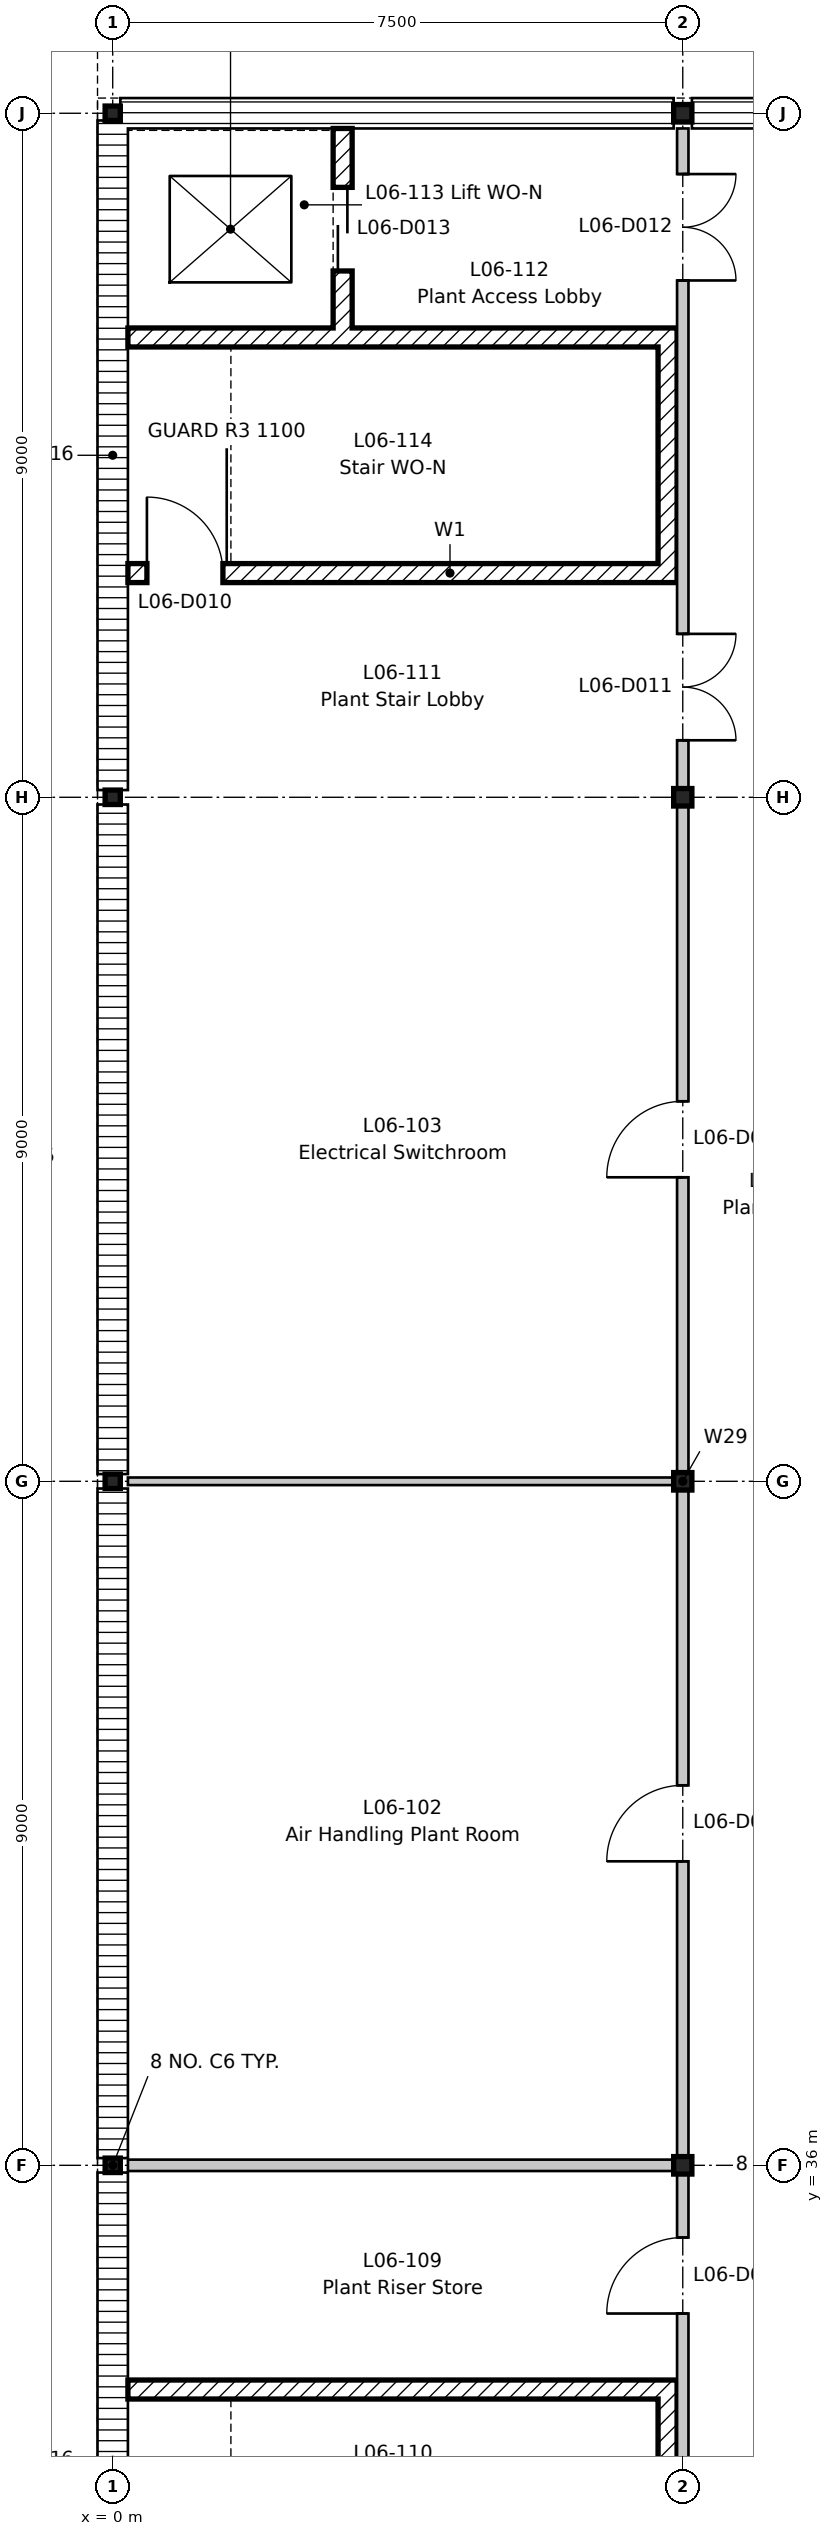
"""IFC4 building model, lengths in metres.
Left out: names, types, materials, properties, quantities, classifications, styles, units other than length and angle.
Written with IfcOpenShell. Run it as: python <this file> out.ifc"""

import sys

from ifc_helpers import new_model, si_unit, direction, frame, frame_2d, origin, origin_2d, place, context, subcontext, project, spatial, rectangle, i_section, extrude, element, fill, save


model = new_model("IFC4")
c1 = context("Model", 3, precision=1e-05, world=origin(), true_north=direction((0.0, 1.0)))
c2 = subcontext(c1, "Body", "Model", "MODEL_VIEW")
j1 = project(units=[si_unit("LENGTHUNIT", "METRE"), si_unit("PLANEANGLEUNIT", "RADIAN")], contexts=[c1])
p1 = place(None, origin())
s1 = spatial("IfcSite", under=j1, at=p1, CompositionType="ELEMENT")
p2 = place(p1, origin())
s2 = spatial("IfcBuilding", under=s1, at=p2, CompositionType="ELEMENT")
p3 = place(p2, frame((0.0, 0.0, 27.0)))
s3 = spatial("IfcBuildingStorey", under=s2, at=p3, CompositionType="ELEMENT", Elevation=27.0)
p4 = place(p3, frame((0.2, 56.95, 0.0), z_axis=(0.0, 0.0, 1.0), x_axis=(1.0, 0.0, 0.0)))
e1 = element("IfcWall", 1, at=p4, inside=s3, PredefinedType="SHEAR", context=c2, shape_type="SweptSolid", body=[
    extrude(rectangle(XDim=7.225, YDim=0.25, at=frame_2d((3.613, 0.0))), origin(), (0.0, 0.0, 1.0), 3.35),
])
p5 = place(p4, frame((0.25, 0.0, 0.0)))
e2 = element("IfcOpeningElement", 2, at=p5, cuts=e1, PredefinedType="OPENING", context=c2, shape_type="SweptSolid", body=[
    extrude(rectangle(XDim=1.0, YDim=2.1, at=frame_2d((0.5, 1.05))), frame((0.0, 0.135, 0.0), z_axis=(0.0, -1.0, 0.0), x_axis=(1.0, 0.0, 0.0)), (0.0, 0.0, 1.0), 0.27),
])
p6 = place(p3, frame((0.2, 60.05, 0.0), z_axis=(0.0, 0.0, 1.0), x_axis=(1.0, 0.0, 0.0)))
e3 = element("IfcWall", 3, at=p6, inside=s3, PredefinedType="SHEAR", context=c2, shape_type="SweptSolid", body=[
    extrude(rectangle(XDim=7.225, YDim=0.25, at=frame_2d((3.613, 0.0))), origin(), (0.0, 0.0, 1.0), 3.35),
])
p7 = place(p3, frame((7.3, 57.075, 0.0), z_axis=(0.0, 0.0, 1.0), x_axis=(0.0, 1.0, 0.0)))
e4 = element("IfcWall", 4, at=p7, inside=s3, PredefinedType="SHEAR", context=c2, shape_type="SweptSolid", body=[
    extrude(rectangle(XDim=2.85, YDim=0.25, at=frame_2d((1.425, 0.0))), origin(), (0.0, 0.0, 1.0), 3.35),
])
p8 = place(p3, frame((3.025, 60.175, 0.0), z_axis=(0.0, 0.0, 1.0), x_axis=(0.0, 1.0, 0.0)))
e5 = element("IfcWall", 5, at=p8, inside=s3, PredefinedType="SHEAR", context=c2, shape_type="SweptSolid", body=[
    extrude(rectangle(XDim=2.625, YDim=0.25, at=frame_2d((1.312, 0.0))), origin(), (0.0, 0.0, 1.0), 3.35),
])
p9 = place(p8, frame((0.75, 0.0, 0.0)))
e6 = element("IfcOpeningElement", 6, at=p9, cuts=e5, PredefinedType="OPENING", context=c2, shape_type="SweptSolid", body=[
    extrude(rectangle(XDim=1.1, YDim=2.1, at=frame_2d((0.55, 1.05))), frame((0.0, 0.135, 0.0), z_axis=(0.0, -1.0, 0.0), x_axis=(1.0, 0.0, 0.0)), (0.0, 0.0, 1.0), 0.27),
])
p10 = place(p3, frame((0.2, 33.05, 0.0), z_axis=(0.0, 0.0, 1.0), x_axis=(1.0, 0.0, 0.0)))
e7 = element("IfcWall", 7, at=p10, inside=s3, PredefinedType="SHEAR", context=c2, shape_type="SweptSolid", body=[
    extrude(rectangle(XDim=7.225, YDim=0.25, at=frame_2d((3.613, 0.0))), origin(), (0.0, 0.0, 1.0), 3.35),
])
p11 = place(p3, frame((7.3, 30.075, 0.0), z_axis=(0.0, 0.0, 1.0), x_axis=(0.0, 1.0, 0.0)))
e8 = element("IfcWall", 8, at=p11, inside=s3, PredefinedType="SHEAR", context=c2, shape_type="SweptSolid", body=[
    extrude(rectangle(XDim=2.85, YDim=0.25, at=frame_2d((1.425, 0.0))), origin(), (0.0, 0.0, 1.0), 3.35),
])
for number, where, z_axis, x_axis in (
    (9, (0.0, 36.0, -0.25), (0.0, 0.0, 1.0), (1.0, 0.0, 0.0)),
    (10, (0.0, 45.0, -0.25), (0.0, 0.0, 1.0), (1.0, 0.0, 0.0)),
    (11, (0.0, 54.0, -0.25), (0.0, 0.0, 1.0), (1.0, 0.0, 0.0)),
    (12, (0.0, 63.0, -0.25), (0.0, 0.0, 1.0), (1.0, 0.0, 0.0)),
):
    element("IfcColumn", number, at=place(p3, frame(where, z_axis=z_axis, x_axis=x_axis)), inside=s3, PredefinedType="COLUMN", context=c2, shape_type="SweptSolid", body=[
        extrude(i_section(OverallWidth=0.2, OverallDepth=0.19, WebThickness=0.007, FlangeThickness=0.01, FilletRadius=0.018, at=origin_2d()), origin(), (0.0, 0.0, 1.0), 3.6),
    ])
for number, where, z_axis, x_axis in (
    (13, (7.5, 36.0, -0.25), (0.0, 0.0, 1.0), (1.0, 0.0, 0.0)),
    (14, (7.5, 45.0, -0.25), (0.0, 0.0, 1.0), (1.0, 0.0, 0.0)),
    (15, (7.5, 54.0, -0.25), (0.0, 0.0, 1.0), (1.0, 0.0, 0.0)),
    (16, (7.5, 63.0, -0.25), (0.0, 0.0, 1.0), (1.0, 0.0, 0.0)),
):
    element("IfcColumn", number, at=place(p3, frame(where, z_axis=z_axis, x_axis=x_axis)), inside=s3, PredefinedType="COLUMN", context=c2, shape_type="SweptSolid", body=[
        extrude(i_section(OverallWidth=0.24, OverallDepth=0.23, WebThickness=0.008, FlangeThickness=0.012, FilletRadius=0.021, at=origin_2d()), origin(), (0.0, 0.0, 1.0), 3.6),
    ])
for number, where, z_axis, x_axis in (
    (17, (0.0, 27.095, 0.0), (0.0, 0.0, 1.0), (0.0, 1.0, 0.0)),
    (18, (0.0, 36.095, 0.0), (0.0, 0.0, 1.0), (0.0, 1.0, 0.0)),
    (19, (0.0, 45.095, 0.0), (0.0, 0.0, 1.0), (0.0, 1.0, 0.0)),
    (20, (0.0, 54.095, 0.0), (0.0, 0.0, 1.0), (0.0, 1.0, 0.0)),
):
    element("IfcWall", number, at=place(p3, frame(where, z_axis=z_axis, x_axis=x_axis)), inside=s3, PredefinedType="STANDARD", context=c2, shape_type="SweptSolid", body=[
        extrude(rectangle(XDim=8.81, YDim=0.4, at=frame_2d((4.405, 0.0))), origin(), (0.0, 0.0, 1.0), 2.95),
    ])
p12 = place(p3, frame((0.1, 63.0, 0.0), z_axis=(0.0, 0.0, 1.0), x_axis=(1.0, 0.0, 0.0)))
e21 = element("IfcWall", 21, at=p12, inside=s3, PredefinedType="STANDARD", context=c2, shape_type="SweptSolid", body=[
    extrude(rectangle(XDim=7.28, YDim=0.4, at=frame_2d((3.64, 0.0))), origin(), (0.0, 0.0, 1.0), 3.02),
])
p13 = place(p3, frame((7.62, 63.0, 0.0), z_axis=(0.0, 0.0, 1.0), x_axis=(1.0, 0.0, 0.0)))
e22 = element("IfcWall", 22, at=p13, inside=s3, PredefinedType="STANDARD", context=c2, shape_type="SweptSolid", body=[
    extrude(rectangle(XDim=2.76, YDim=0.4, at=frame_2d((1.38, 0.0))), origin(), (0.0, 0.0, 1.0), 3.15),
])
p14 = place(p3, frame((7.5, 27.2, 0.0), z_axis=(0.0, 0.0, 1.0), x_axis=(0.0, 1.0, 0.0)))
e23 = element("IfcWall", 23, at=p14, inside=s3, PredefinedType="PARTITIONING", context=c2, shape_type="SweptSolid", body=[
    extrude(rectangle(XDim=35.6, YDim=0.15, at=frame_2d((17.8, 0.0))), origin(), (0.0, 0.0, 1.0), 2.83),
])
p15 = place(p14, frame((12.8, 0.0, 0.0)))
e24 = element("IfcOpeningElement", 24, at=p15, cuts=e23, PredefinedType="OPENING", context=c2, shape_type="SweptSolid", body=[
    extrude(rectangle(XDim=1.0, YDim=2.1, at=frame_2d((0.5, 1.05))), frame((0.0, 0.085, 0.0), z_axis=(0.0, -1.0, 0.0), x_axis=(1.0, 0.0, 0.0)), (0.0, 0.0, 1.0), 0.17),
])
p16 = place(p14, frame((21.8, 0.0, 0.0)))
e25 = element("IfcOpeningElement", 25, at=p16, cuts=e23, PredefinedType="OPENING", context=c2, shape_type="SweptSolid", body=[
    extrude(rectangle(XDim=1.0, YDim=2.1, at=frame_2d((0.5, 1.05))), frame((0.0, 0.085, 0.0), z_axis=(0.0, -1.0, 0.0), x_axis=(1.0, 0.0, 0.0)), (0.0, 0.0, 1.0), 0.17),
])
p17 = place(p14, frame((6.85, 0.0, 0.0)))
e26 = element("IfcOpeningElement", 26, at=p17, cuts=e23, PredefinedType="OPENING", context=c2, shape_type="SweptSolid", body=[
    extrude(rectangle(XDim=1.0, YDim=2.1, at=frame_2d((0.5, 1.05))), frame((0.0, 0.085, 0.0), z_axis=(0.0, -1.0, 0.0), x_axis=(1.0, 0.0, 0.0)), (0.0, 0.0, 1.0), 0.17),
])
p18 = place(p14, frame((0.55, 0.0, 0.0)))
e27 = element("IfcOpeningElement", 27, at=p18, cuts=e23, PredefinedType="OPENING", context=c2, shape_type="SweptSolid", body=[
    extrude(rectangle(XDim=1.4, YDim=2.1, at=frame_2d((0.7, 1.05))), frame((0.0, 0.085, 0.0), z_axis=(0.0, -1.0, 0.0), x_axis=(1.0, 0.0, 0.0)), (0.0, 0.0, 1.0), 0.17),
])
p19 = place(p14, frame((27.55, 0.0, 0.0)))
e28 = element("IfcOpeningElement", 28, at=p19, cuts=e23, PredefinedType="OPENING", context=c2, shape_type="SweptSolid", body=[
    extrude(rectangle(XDim=1.4, YDim=2.1, at=frame_2d((0.7, 1.05))), frame((0.0, 0.085, 0.0), z_axis=(0.0, -1.0, 0.0), x_axis=(1.0, 0.0, 0.0)), (0.0, 0.0, 1.0), 0.17),
])
p20 = place(p14, frame((33.6, 0.0, 0.0)))
e29 = element("IfcOpeningElement", 29, at=p20, cuts=e23, PredefinedType="OPENING", context=c2, shape_type="SweptSolid", body=[
    extrude(rectangle(XDim=1.4, YDim=2.1, at=frame_2d((0.7, 1.05))), frame((0.0, 0.085, 0.0), z_axis=(0.0, -1.0, 0.0), x_axis=(1.0, 0.0, 0.0)), (0.0, 0.0, 1.0), 0.17),
])
p21 = place(p3, frame((0.2, 36.0, 0.0), z_axis=(0.0, 0.0, 1.0), x_axis=(1.0, 0.0, 0.0)))
e30 = element("IfcWall", 30, at=p21, inside=s3, PredefinedType="PARTITIONING", context=c2, shape_type="SweptSolid", body=[
    extrude(rectangle(XDim=7.225, YDim=0.15, at=frame_2d((3.613, 0.0))), origin(), (0.0, 0.0, 1.0), 3.0),
])
p22 = place(p3, frame((0.2, 45.0, 0.0), z_axis=(0.0, 0.0, 1.0), x_axis=(1.0, 0.0, 0.0)))
e31 = element("IfcWall", 31, at=p22, inside=s3, PredefinedType="PARTITIONING", context=c2, shape_type="SweptSolid", body=[
    extrude(rectangle(XDim=7.225, YDim=0.1, at=frame_2d((3.613, 0.0))), origin(), (0.0, 0.0, 1.0), 3.0),
])
p23 = place(p15, origin())
e32 = element("IfcDoor", 32, at=p23, inside=s3, OperationType="SINGLE_SWING_LEFT", PredefinedType="DOOR", context=c2, shape_type="SweptSolid", body=[
    extrude(rectangle(XDim=1.0, YDim=2.1, at=frame_2d((0.5, 1.05))), frame((0.0, 0.025, 0.0), z_axis=(0.0, -1.0, 0.0), x_axis=(1.0, 0.0, 0.0)), (0.0, 0.0, 1.0), 0.05),
])
fill(e24, e32)
p24 = place(p16, origin())
e33 = element("IfcDoor", 33, at=p24, inside=s3, OperationType="SINGLE_SWING_LEFT", PredefinedType="DOOR", context=c2, shape_type="SweptSolid", body=[
    extrude(rectangle(XDim=1.0, YDim=2.1, at=frame_2d((0.5, 1.05))), frame((0.0, 0.025, 0.0), z_axis=(0.0, -1.0, 0.0), x_axis=(1.0, 0.0, 0.0)), (0.0, 0.0, 1.0), 0.05),
])
fill(e25, e33)
p25 = place(p17, origin())
e34 = element("IfcDoor", 34, at=p25, inside=s3, OperationType="SINGLE_SWING_LEFT", PredefinedType="DOOR", context=c2, shape_type="SweptSolid", body=[
    extrude(rectangle(XDim=1.0, YDim=2.1, at=frame_2d((0.5, 1.05))), frame((0.0, 0.025, 0.0), z_axis=(0.0, -1.0, 0.0), x_axis=(1.0, 0.0, 0.0)), (0.0, 0.0, 1.0), 0.05),
])
fill(e26, e34)
p26 = place(p5, origin())
e35 = element("IfcDoor", 35, at=p26, inside=s3, OperationType="SINGLE_SWING_LEFT", PredefinedType="DOOR", context=c2, shape_type="SweptSolid", body=[
    extrude(rectangle(XDim=1.0, YDim=2.1, at=frame_2d((0.5, 1.05))), frame((0.0, 0.025, 0.0), z_axis=(0.0, -1.0, 0.0), x_axis=(1.0, 0.0, 0.0)), (0.0, 0.0, 1.0), 0.05),
])
fill(e2, e35)
p27 = place(p19, frame((1.4, 0.0, 0.0), z_axis=(0.0, 0.0, 1.0), x_axis=(-1.0, 0.0, 0.0)))
e36 = element("IfcDoor", 36, at=p27, inside=s3, OperationType="DOUBLE_DOOR_SINGLE_SWING", PredefinedType="DOOR", context=c2, shape_type="SweptSolid", body=[
    extrude(rectangle(XDim=1.4, YDim=2.1, at=frame_2d((0.7, 1.05))), frame((0.0, 0.025, 0.0), z_axis=(0.0, -1.0, 0.0), x_axis=(1.0, 0.0, 0.0)), (0.0, 0.0, 1.0), 0.05),
])
fill(e28, e36)
p28 = place(p20, frame((1.4, 0.0, 0.0), z_axis=(0.0, 0.0, 1.0), x_axis=(-1.0, 0.0, 0.0)))
e37 = element("IfcDoor", 37, at=p28, inside=s3, OperationType="DOUBLE_DOOR_SINGLE_SWING", PredefinedType="DOOR", context=c2, shape_type="SweptSolid", body=[
    extrude(rectangle(XDim=1.4, YDim=2.1, at=frame_2d((0.7, 1.05))), frame((0.0, 0.025, 0.0), z_axis=(0.0, -1.0, 0.0), x_axis=(1.0, 0.0, 0.0)), (0.0, 0.0, 1.0), 0.05),
])
fill(e29, e37)
p29 = place(p9, origin())
e38 = element("IfcDoor", 38, at=p29, inside=s3, OperationType="SLIDING_TO_LEFT", PredefinedType="DOOR", context=c2, shape_type="SweptSolid", body=[
    extrude(rectangle(XDim=1.1, YDim=2.1, at=frame_2d((0.55, 1.05))), frame((0.0, 0.025, 0.0), z_axis=(0.0, -1.0, 0.0), x_axis=(1.0, 0.0, 0.0)), (0.0, 0.0, 1.0), 0.05),
])
fill(e6, e38)
save(model, sys.argv[1])
